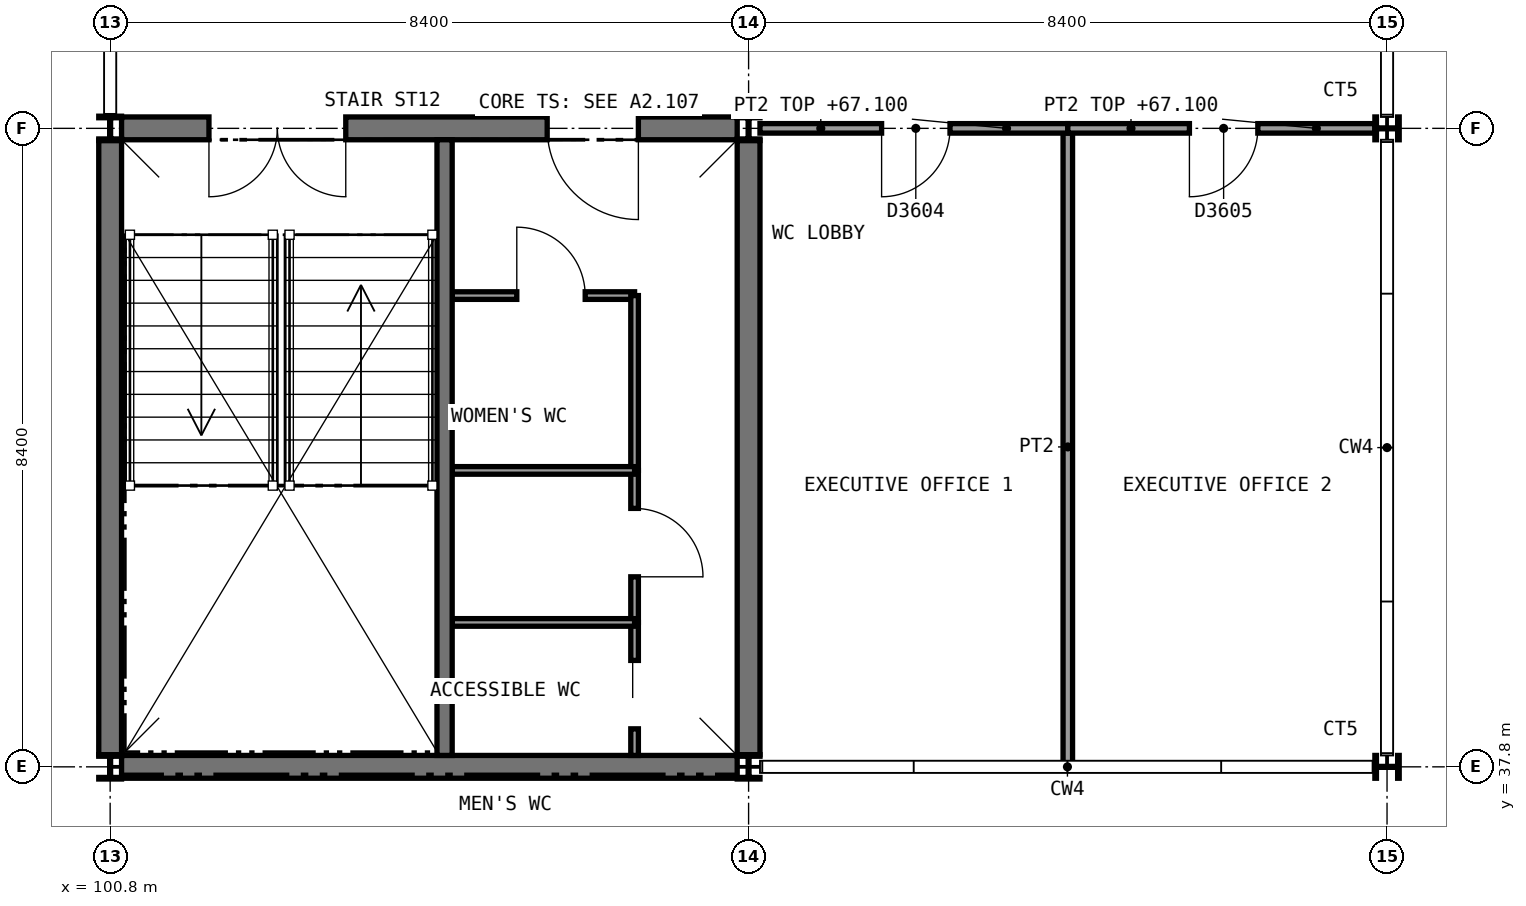
"""IFC4 building model, lengths in metres.
Left out: names, types, materials, properties, quantities, classifications, styles, units other than length and angle.
Written with IfcOpenShell. Run it as: python <this file> out.ifc"""

import sys

from ifc_helpers import new_model, si_unit, direction, frame, frame_2d, origin, origin_2d, place, context, subcontext, project, spatial, rectangle, i_section, extrude, element, fill, save


model = new_model("IFC4")
c1 = context("Model", 3, precision=1e-05, world=origin(), true_north=direction((0.0, 1.0)))
c2 = subcontext(c1, "Body", "Model", "MODEL_VIEW")
j1 = project(units=[si_unit("LENGTHUNIT", "METRE"), si_unit("PLANEANGLEUNIT", "RADIAN")], contexts=[c1])
p1 = place(None, origin())
s1 = spatial("IfcSite", under=j1, at=p1, CompositionType="ELEMENT")
p2 = place(p1, origin())
s2 = spatial("IfcBuilding", under=s1, at=p2, CompositionType="ELEMENT")
p3 = place(p2, frame((0.0, 0.0, 63.6)))
s3 = spatial("IfcBuildingStorey", under=s2, at=p3, CompositionType="ELEMENT", Elevation=63.6)
p4 = place(p3, frame((100.95, 37.8, 0.0), z_axis=(0.0, 0.0, 1.0), x_axis=(1.0, 0.0, 0.0)))
e1 = element("IfcWall", 1, at=p4, inside=s3, PredefinedType="SHEAR", context=c2, shape_type="SweptSolid", body=[
    extrude(rectangle(XDim=8.1, YDim=0.3, at=frame_2d((4.05, 0.0))), origin(), (0.0, 0.0, 1.0), 3.85),
])
p5 = place(p3, frame((100.95, 46.2, 0.0), z_axis=(0.0, 0.0, 1.0), x_axis=(1.0, 0.0, 0.0)))
e2 = element("IfcWall", 2, at=p5, inside=s3, PredefinedType="SHEAR", context=c2, shape_type="SweptSolid", body=[
    extrude(rectangle(XDim=8.1, YDim=0.3, at=frame_2d((4.05, 0.0))), origin(), (0.0, 0.0, 1.0), 3.85),
])
p6 = place(p5, frame((1.15, 0.0, 0.0)))
e3 = element("IfcOpeningElement", 3, at=p6, cuts=e2, PredefinedType="OPENING", context=c2, shape_type="SweptSolid", body=[
    extrude(rectangle(XDim=1.8, YDim=2.1, at=frame_2d((0.9, 1.05))), frame((0.0, 0.16, 0.0), z_axis=(0.0, -1.0, 0.0), x_axis=(1.0, 0.0, 0.0)), (0.0, 0.0, 1.0), 0.32),
])
p7 = place(p5, frame((5.6, 0.0, 0.0)))
e4 = element("IfcOpeningElement", 4, at=p7, cuts=e2, PredefinedType="OPENING", context=c2, shape_type="SweptSolid", body=[
    extrude(rectangle(XDim=1.2, YDim=2.1, at=frame_2d((0.6, 1.05))), frame((0.0, 0.16, 0.0), z_axis=(0.0, -1.0, 0.0), x_axis=(1.0, 0.0, 0.0)), (0.0, 0.0, 1.0), 0.32),
])
for number, where, z_axis, x_axis in (
    (5, (100.8, 37.96, 0.0), (0.0, 0.0, 1.0), (0.0, 1.0, 0.0)),
    (6, (109.2, 37.96, 0.0), (0.0, 0.0, 1.0), (0.0, 1.0, 0.0)),
):
    element("IfcWall", number, at=place(p3, frame(where, z_axis=z_axis, x_axis=x_axis)), inside=s3, PredefinedType="SHEAR", context=c2, shape_type="SweptSolid", body=[
        extrude(rectangle(XDim=8.08, YDim=0.3, at=frame_2d((4.04, 0.0))), origin(), (0.0, 0.0, 1.0), 3.85),
    ])
for number, where, z_axis, x_axis in (
    (7, (100.8, 37.8, 0.0), (0.0, 0.0, 1.0), (1.0, 0.0, 0.0)),
    (8, (100.8, 46.2, 0.0), (0.0, 0.0, 1.0), (1.0, 0.0, 0.0)),
    (9, (109.2, 37.8, 0.0), (0.0, 0.0, 1.0), (1.0, 0.0, 0.0)),
    (10, (109.2, 46.2, 0.0), (0.0, 0.0, 1.0), (1.0, 0.0, 0.0)),
    (11, (117.6, 37.8, 0.0), (0.0, 0.0, 1.0), (0.0, 1.0, 0.0)),
    (12, (117.6, 46.2, 0.0), (0.0, 0.0, 1.0), (0.0, 1.0, 0.0)),
):
    element("IfcColumn", number, at=place(p3, frame(where, z_axis=z_axis, x_axis=x_axis)), inside=s3, PredefinedType="COLUMN", context=c2, shape_type="SweptSolid", body=[
        extrude(i_section(OverallWidth=0.3, OverallDepth=0.32, WebThickness=0.011, FlangeThickness=0.021, FilletRadius=0.027, at=origin_2d()), origin(), (0.0, 0.0, 1.0), 4.0),
    ])
p8 = place(p3, frame((105.3, 44.0, 0.0), z_axis=(0.0, 0.0, 1.0), x_axis=(1.0, 0.0, 0.0)))
e13 = element("IfcWall", 13, at=p8, inside=s3, PredefinedType="PARTITIONING", context=c2, shape_type="SweptSolid", body=[
    extrude(rectangle(XDim=2.4, YDim=0.1, at=frame_2d((1.2, 0.0))), origin(), (0.0, 0.0, 1.0), 3.78),
])
p9 = place(p8, frame((0.85, 0.0, 0.0)))
e14 = element("IfcOpeningElement", 14, at=p9, cuts=e13, PredefinedType="OPENING", context=c2, shape_type="SweptSolid", body=[
    extrude(rectangle(XDim=0.9, YDim=2.1, at=frame_2d((0.45, 1.05))), frame((0.0, 0.06, 0.0), z_axis=(0.0, -1.0, 0.0), x_axis=(1.0, 0.0, 0.0)), (0.0, 0.0, 1.0), 0.12),
])
p10 = place(p3, frame((107.7, 41.7, 0.0), z_axis=(0.0, 0.0, 1.0), x_axis=(0.0, 1.0, 0.0)))
e15 = element("IfcWall", 15, at=p10, inside=s3, PredefinedType="PARTITIONING", context=c2, shape_type="SweptSolid", body=[
    extrude(rectangle(XDim=2.3, YDim=0.1, at=frame_2d((1.15, 0.0))), origin(), (0.0, 0.0, 1.0), 3.78),
])
p11 = place(p3, frame((107.7, 39.7, 0.0), z_axis=(0.0, 0.0, 1.0), x_axis=(0.0, 1.0, 0.0)))
e16 = element("IfcWall", 16, at=p11, inside=s3, PredefinedType="PARTITIONING", context=c2, shape_type="SweptSolid", body=[
    extrude(rectangle(XDim=2.0, YDim=0.1, at=frame_2d((1.0, 0.0))), origin(), (0.0, 0.0, 1.0), 3.78),
])
p12 = place(p11, frame((0.6, 0.0, 0.0)))
e17 = element("IfcOpeningElement", 17, at=p12, cuts=e16, PredefinedType="OPENING", context=c2, shape_type="SweptSolid", body=[
    extrude(rectangle(XDim=0.9, YDim=2.1, at=frame_2d((0.45, 1.05))), frame((0.0, 0.06, 0.0), z_axis=(0.0, -1.0, 0.0), x_axis=(1.0, 0.0, 0.0)), (0.0, 0.0, 1.0), 0.12),
])
p13 = place(p3, frame((107.7, 37.95, 0.0), z_axis=(0.0, 0.0, 1.0), x_axis=(0.0, 1.0, 0.0)))
e18 = element("IfcWall", 18, at=p13, inside=s3, PredefinedType="PARTITIONING", context=c2, shape_type="SweptSolid", body=[
    extrude(rectangle(XDim=1.75, YDim=0.1, at=frame_2d((0.875, 0.0))), origin(), (0.0, 0.0, 1.0), 3.78),
])
p14 = place(p13, frame((0.35, 0.0, 0.0)))
e19 = element("IfcOpeningElement", 19, at=p14, cuts=e18, PredefinedType="OPENING", context=c2, shape_type="SweptSolid", body=[
    extrude(rectangle(XDim=0.9, YDim=2.1, at=frame_2d((0.45, 1.05))), frame((0.0, 0.06, 0.0), z_axis=(0.0, -1.0, 0.0), x_axis=(1.0, 0.0, 0.0)), (0.0, 0.0, 1.0), 0.12),
])
for number, where, z_axis, x_axis in (
    (20, (105.3, 41.7, 0.0), (0.0, 0.0, 1.0), (1.0, 0.0, 0.0)),
    (21, (105.3, 39.7, 0.0), (0.0, 0.0, 1.0), (1.0, 0.0, 0.0)),
):
    element("IfcWall", number, at=place(p3, frame(where, z_axis=z_axis, x_axis=x_axis)), inside=s3, PredefinedType="PARTITIONING", context=c2, shape_type="SweptSolid", body=[
        extrude(rectangle(XDim=2.4, YDim=0.1, at=frame_2d((1.2, 0.0))), origin(), (0.0, 0.0, 1.0), 3.78),
    ])
p15 = place(p3, frame((113.4, 37.8, 0.0), z_axis=(0.0, 0.0, 1.0), x_axis=(0.0, 1.0, 0.0)))
e22 = element("IfcWall", 22, at=p15, inside=s3, PredefinedType="PARTITIONING", context=c2, shape_type="SweptSolid", body=[
    extrude(rectangle(XDim=8.4, YDim=0.125, at=frame_2d((4.2, 0.0))), origin(), (0.0, 0.0, 1.0), 3.85),
])
p16 = place(p3, frame((109.35, 46.2, 0.0), z_axis=(0.0, 0.0, 1.0), x_axis=(1.0, 0.0, 0.0)))
e23 = element("IfcWall", 23, at=p16, inside=s3, PredefinedType="PARTITIONING", context=c2, shape_type="SweptSolid", body=[
    extrude(rectangle(XDim=4.05, YDim=0.125, at=frame_2d((2.025, 0.0))), origin(), (0.0, 0.0, 1.0), 3.5),
])
p17 = place(p16, frame((1.6, 0.0, 0.0)))
e24 = element("IfcOpeningElement", 24, at=p17, cuts=e23, PredefinedType="OPENING", context=c2, shape_type="SweptSolid", body=[
    extrude(rectangle(XDim=0.9, YDim=2.1, at=frame_2d((0.45, 1.05))), frame((0.0, 0.073, 0.0), z_axis=(0.0, -1.0, 0.0), x_axis=(1.0, 0.0, 0.0)), (0.0, 0.0, 1.0), 0.145),
])
p18 = place(p3, frame((113.4, 46.2, 0.0), z_axis=(0.0, 0.0, 1.0), x_axis=(1.0, 0.0, 0.0)))
e25 = element("IfcWall", 25, at=p18, inside=s3, PredefinedType="PARTITIONING", context=c2, shape_type="SweptSolid", body=[
    extrude(rectangle(XDim=4.04, YDim=0.125, at=frame_2d((2.02, 0.0))), origin(), (0.0, 0.0, 1.0), 3.5),
])
p19 = place(p18, frame((1.6, 0.0, 0.0)))
e26 = element("IfcOpeningElement", 26, at=p19, cuts=e25, PredefinedType="OPENING", context=c2, shape_type="SweptSolid", body=[
    extrude(rectangle(XDim=0.9, YDim=2.1, at=frame_2d((0.45, 1.05))), frame((0.0, 0.073, 0.0), z_axis=(0.0, -1.0, 0.0), x_axis=(1.0, 0.0, 0.0)), (0.0, 0.0, 1.0), 0.145),
])
p20 = place(p3, frame((105.2, 37.95, 0.0), z_axis=(0.0, 0.0, 1.0), x_axis=(0.0, 1.0, 0.0)))
e27 = element("IfcWall", 27, at=p20, inside=s3, PredefinedType="SHEAR", context=c2, shape_type="SweptSolid", body=[
    extrude(rectangle(XDim=8.1, YDim=0.2, at=frame_2d((4.05, 0.0))), origin(), (0.0, 0.0, 1.0), 3.85),
])
p21 = place(p9, origin())
e28 = element("IfcDoor", 28, at=p21, inside=s3, OperationType="SINGLE_SWING_LEFT", PredefinedType="DOOR", context=c2, shape_type="SweptSolid", body=[
    extrude(rectangle(XDim=0.9, YDim=2.1, at=frame_2d((0.45, 1.05))), frame((0.0, 0.025, 0.0), z_axis=(0.0, -1.0, 0.0), x_axis=(1.0, 0.0, 0.0)), (0.0, 0.0, 1.0), 0.05),
])
fill(e14, e28)
p22 = place(p12, frame((0.9, 0.0, 0.0), z_axis=(0.0, 0.0, 1.0), x_axis=(-1.0, 0.0, 0.0)))
e29 = element("IfcDoor", 29, at=p22, inside=s3, OperationType="SINGLE_SWING_RIGHT", PredefinedType="DOOR", context=c2, shape_type="SweptSolid", body=[
    extrude(rectangle(XDim=0.9, YDim=2.1, at=frame_2d((0.45, 1.05))), frame((0.0, 0.025, 0.0), z_axis=(0.0, -1.0, 0.0), x_axis=(1.0, 0.0, 0.0)), (0.0, 0.0, 1.0), 0.05),
])
fill(e17, e29)
p23 = place(p14, origin())
e30 = element("IfcDoor", 30, at=p23, inside=s3, OperationType="SLIDING_TO_RIGHT", PredefinedType="DOOR", context=c2, shape_type="SweptSolid", body=[
    extrude(rectangle(XDim=0.9, YDim=2.1, at=frame_2d((0.45, 1.05))), frame((0.0, 0.025, 0.0), z_axis=(0.0, -1.0, 0.0), x_axis=(1.0, 0.0, 0.0)), (0.0, 0.0, 1.0), 0.05),
])
fill(e19, e30)
p24 = place(p17, frame((0.9, 0.0, 0.0), z_axis=(0.0, 0.0, 1.0), x_axis=(-1.0, 0.0, 0.0)))
e31 = element("IfcDoor", 31, at=p24, inside=s3, OperationType="SINGLE_SWING_RIGHT", PredefinedType="DOOR", context=c2, shape_type="SweptSolid", body=[
    extrude(rectangle(XDim=0.9, YDim=2.1, at=frame_2d((0.45, 1.05))), frame((0.0, 0.025, 0.0), z_axis=(0.0, -1.0, 0.0), x_axis=(1.0, 0.0, 0.0)), (0.0, 0.0, 1.0), 0.05),
])
fill(e24, e31)
p25 = place(p19, frame((0.9, 0.0, 0.0), z_axis=(0.0, 0.0, 1.0), x_axis=(-1.0, 0.0, 0.0)))
e32 = element("IfcDoor", 32, at=p25, inside=s3, OperationType="SINGLE_SWING_RIGHT", PredefinedType="DOOR", context=c2, shape_type="SweptSolid", body=[
    extrude(rectangle(XDim=0.9, YDim=2.1, at=frame_2d((0.45, 1.05))), frame((0.0, 0.025, 0.0), z_axis=(0.0, -1.0, 0.0), x_axis=(1.0, 0.0, 0.0)), (0.0, 0.0, 1.0), 0.05),
])
fill(e26, e32)
p26 = place(p6, frame((1.8, 0.0, 0.0), z_axis=(0.0, 0.0, 1.0), x_axis=(-1.0, 0.0, 0.0)))
e33 = element("IfcDoor", 33, at=p26, inside=s3, OperationType="DOUBLE_DOOR_SINGLE_SWING", PredefinedType="DOOR", context=c2, shape_type="SweptSolid", body=[
    extrude(rectangle(XDim=1.8, YDim=2.1, at=frame_2d((0.9, 1.05))), frame((0.0, 0.025, 0.0), z_axis=(0.0, -1.0, 0.0), x_axis=(1.0, 0.0, 0.0)), (0.0, 0.0, 1.0), 0.05),
])
fill(e3, e33)
p27 = place(p7, frame((1.2, 0.0, 0.0), z_axis=(0.0, 0.0, 1.0), x_axis=(-1.0, 0.0, 0.0)))
e34 = element("IfcDoor", 34, at=p27, inside=s3, OperationType="SINGLE_SWING_LEFT", PredefinedType="DOOR", context=c2, shape_type="SweptSolid", body=[
    extrude(rectangle(XDim=1.2, YDim=2.1, at=frame_2d((0.6, 1.05))), frame((0.0, 0.025, 0.0), z_axis=(0.0, -1.0, 0.0), x_axis=(1.0, 0.0, 0.0)), (0.0, 0.0, 1.0), 0.05),
])
fill(e4, e34)
save(model, sys.argv[1])
